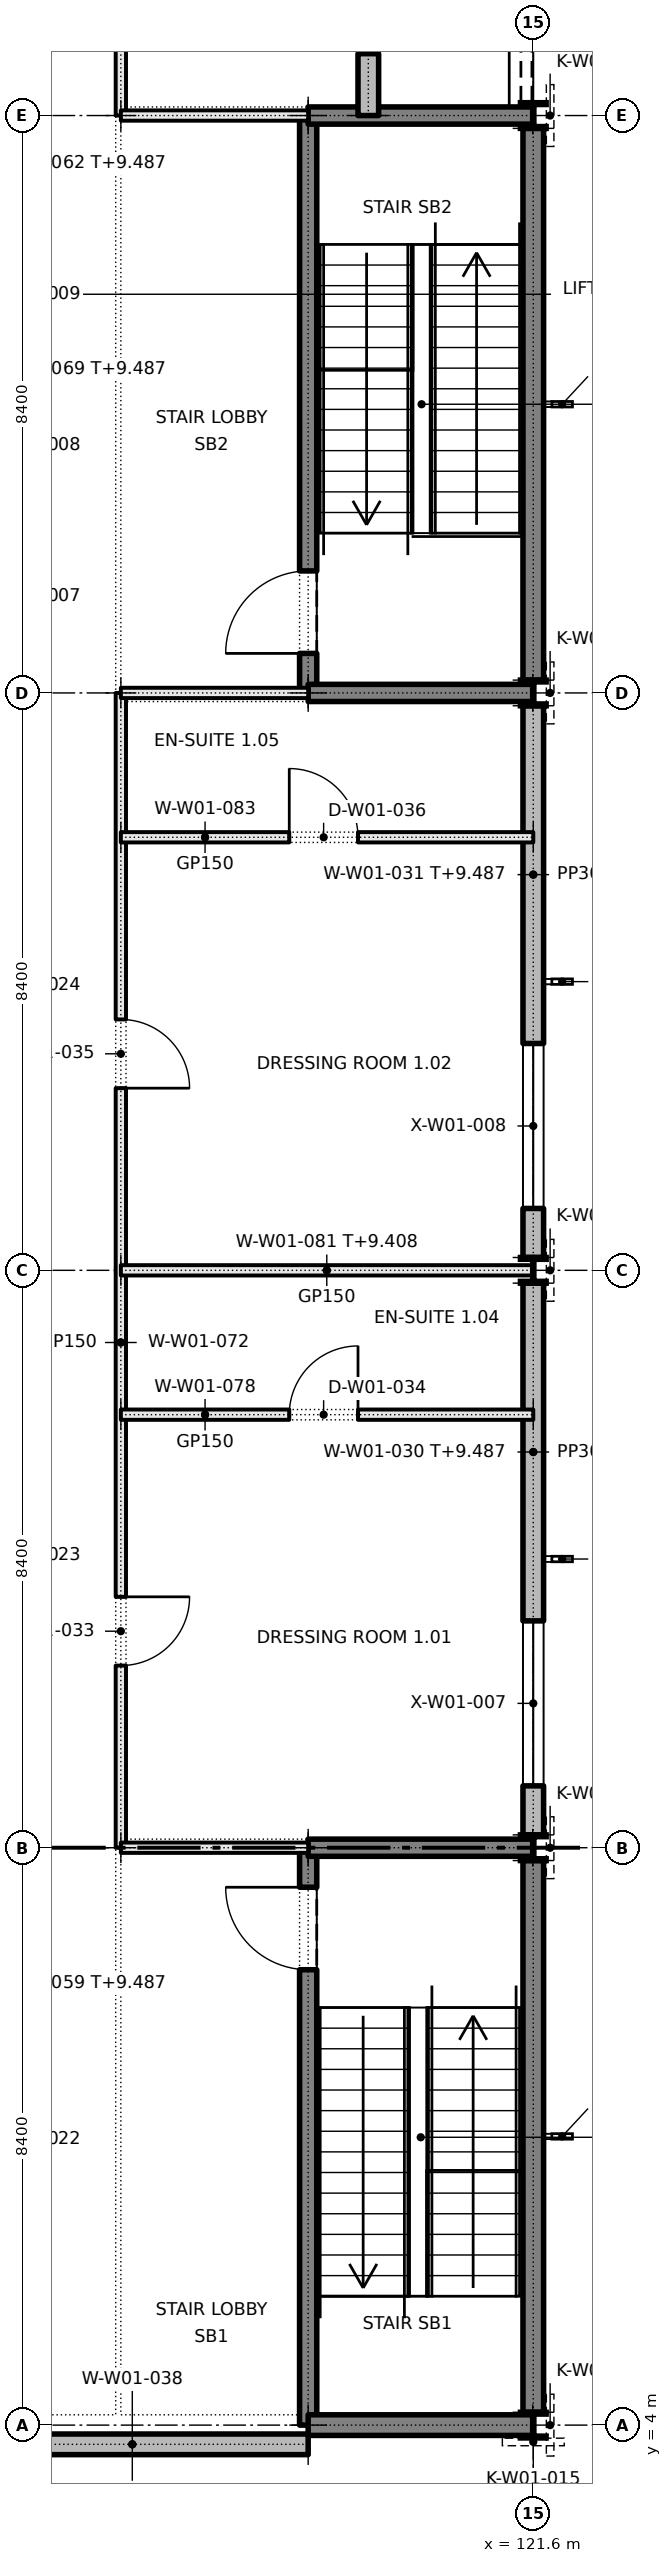
"""IFC4 building model, lengths in metres.
Left out: names, types, materials, properties, quantities, classifications, styles, units other than length and angle.
Written with IfcOpenShell. Run it as: python <this file> out.ifc"""

import sys

from ifc_helpers import new_model, si_unit, direction, frame, frame_2d, origin, origin_2d, place, context, subcontext, project, spatial, rectangle, i_section, extrude, element, fill, save


model = new_model("IFC4")
c1 = context("Model", 3, precision=1e-05, world=origin(), true_north=direction((0.0, 1.0)))
c2 = subcontext(c1, "Body", "Model", "MODEL_VIEW")
j1 = project(units=[si_unit("LENGTHUNIT", "METRE"), si_unit("PLANEANGLEUNIT", "RADIAN")], contexts=[c1])
p1 = place(None, origin())
s1 = spatial("IfcSite", under=j1, at=p1, CompositionType="ELEMENT")
p2 = place(p1, origin())
s2 = spatial("IfcBuilding", under=s1, at=p2, CompositionType="ELEMENT")
p3 = place(p2, frame((0.0, 0.0, 5.4)))
s3 = spatial("IfcBuildingStorey", under=s2, at=p3, CompositionType="ELEMENT", Elevation=5.4)
for number, where, z_axis, x_axis in (
    (1, (121.6, 4.0, 0.0), (0.0, 0.0, 1.0), (1.0, 0.0, 0.0)),
    (2, (121.6, 12.4, 0.0), (0.0, 0.0, 1.0), (1.0, 0.0, 0.0)),
    (3, (121.6, 20.8, 0.0), (0.0, 0.0, 1.0), (1.0, 0.0, 0.0)),
    (4, (121.6, 29.2, 0.0), (0.0, 0.0, 1.0), (1.0, 0.0, 0.0)),
    (5, (121.6, 37.6, 0.0), (0.0, 0.0, 1.0), (1.0, 0.0, 0.0)),
):
    element("IfcColumn", number, at=place(p3, frame(where, z_axis=z_axis, x_axis=x_axis)), inside=s3, PredefinedType="COLUMN", context=c2, shape_type="SweptSolid", body=[
        extrude(i_section(OverallWidth=0.373, OverallDepth=0.373, WebThickness=0.016, FlangeThickness=0.026, FilletRadius=0.015, at=origin_2d()), origin(), (0.0, 0.0, 1.0), 4.8),
    ])
p4 = place(p3, frame((118.325, 4.0, 0.0), z_axis=(0.0, 0.0, 1.0), x_axis=(0.0, 1.0, 0.0)))
e6 = element("IfcWall", 6, at=p4, inside=s3, PredefinedType="SHEAR", context=c2, shape_type="SweptSolid", body=[
    extrude(rectangle(XDim=8.4, YDim=0.25, at=frame_2d((4.2, 0.0))), origin(), (0.0, 0.0, 1.0), 4.8),
])
p5 = place(p4, frame((6.625, 0.0, 0.0)))
e7 = element("IfcOpeningElement", 7, at=p5, cuts=e6, PredefinedType="OPENING", context=c2, shape_type="SweptSolid", body=[
    extrude(rectangle(XDim=1.2, YDim=2.1, at=frame_2d((0.6, 1.05))), frame((0.0, 0.135, 0.0), z_axis=(0.0, -1.0, 0.0), x_axis=(1.0, 0.0, 0.0)), (0.0, 0.0, 1.0), 0.27),
])
p6 = place(p3, frame((118.325, 29.2, 0.0), z_axis=(0.0, 0.0, 1.0), x_axis=(0.0, 1.0, 0.0)))
e8 = element("IfcWall", 8, at=p6, inside=s3, PredefinedType="SHEAR", context=c2, shape_type="SweptSolid", body=[
    extrude(rectangle(XDim=8.4, YDim=0.25, at=frame_2d((4.2, 0.0))), origin(), (0.0, 0.0, 1.0), 4.8),
])
p7 = place(p6, frame((0.575, 0.0, 0.0)))
e9 = element("IfcOpeningElement", 9, at=p7, cuts=e8, PredefinedType="OPENING", context=c2, shape_type="SweptSolid", body=[
    extrude(rectangle(XDim=1.2, YDim=2.1, at=frame_2d((0.6, 1.05))), frame((0.0, 0.135, 0.0), z_axis=(0.0, -1.0, 0.0), x_axis=(1.0, 0.0, 0.0)), (0.0, 0.0, 1.0), 0.27),
])
for number, where, z_axis, x_axis in (
    (10, (121.6, 4.187, 0.0), (0.0, 0.0, 1.0), (0.0, 1.0, 0.0)),
    (11, (121.6, 29.387, 0.0), (0.0, 0.0, 1.0), (0.0, 1.0, 0.0)),
):
    element("IfcWall", number, at=place(p3, frame(where, z_axis=z_axis, x_axis=x_axis)), inside=s3, PredefinedType="SHEAR", context=c2, shape_type="SweptSolid", body=[
        extrude(rectangle(XDim=8.027, YDim=0.3, at=frame_2d((4.013, 0.0))), origin(), (0.0, 0.0, 1.0), 4.8),
    ])
p8 = place(p3, frame((118.325, 4.0, 0.0), z_axis=(0.0, 0.0, 1.0), x_axis=(1.0, 0.0, 0.0)))
e12 = element("IfcWall", 12, at=p8, inside=s3, PredefinedType="SHEAR", context=c2, shape_type="SweptSolid", body=[
    extrude(rectangle(XDim=3.267, YDim=0.3, at=frame_2d((1.633, 0.0))), origin(), (0.0, 0.0, 1.0), 4.8),
])
for number, where, z_axis, x_axis in (
    (13, (118.325, 12.4, 0.0), (0.0, 0.0, 1.0), (1.0, 0.0, 0.0)),
    (14, (118.325, 29.2, 0.0), (0.0, 0.0, 1.0), (1.0, 0.0, 0.0)),
    (15, (118.325, 37.6, 0.0), (0.0, 0.0, 1.0), (1.0, 0.0, 0.0)),
):
    element("IfcWall", number, at=place(p3, frame(where, z_axis=z_axis, x_axis=x_axis)), inside=s3, PredefinedType="SHEAR", context=c2, shape_type="SweptSolid", body=[
        extrude(rectangle(XDim=3.267, YDim=0.25, at=frame_2d((1.633, 0.0))), origin(), (0.0, 0.0, 1.0), 4.8),
    ])
p9 = place(p3, frame((121.6, 12.587, 0.0), z_axis=(0.0, 0.0, 1.0), x_axis=(0.0, 1.0, 0.0)))
e16 = element("IfcWall", 16, at=p9, inside=s3, PredefinedType="SOLIDWALL", context=c2, shape_type="SweptSolid", body=[
    extrude(rectangle(XDim=8.027, YDim=0.3, at=frame_2d((4.013, 0.0))), origin(), (0.0, 0.0, 1.0), 4.087),
])
p10 = place(p9, frame((0.713, 0.0, 0.95)))
e17 = element("IfcOpeningElement", 17, at=p10, cuts=e16, PredefinedType="OPENING", context=c2, shape_type="SweptSolid", body=[
    extrude(rectangle(XDim=2.4, YDim=1.8, at=frame_2d((1.2, 0.9))), frame((0.0, 0.16, 0.0), z_axis=(0.0, -1.0, 0.0), x_axis=(1.0, 0.0, 0.0)), (0.0, 0.0, 1.0), 0.32),
])
p11 = place(p3, frame((121.6, 20.987, 0.0), z_axis=(0.0, 0.0, 1.0), x_axis=(0.0, 1.0, 0.0)))
e18 = element("IfcWall", 18, at=p11, inside=s3, PredefinedType="SOLIDWALL", context=c2, shape_type="SweptSolid", body=[
    extrude(rectangle(XDim=8.027, YDim=0.3, at=frame_2d((4.013, 0.0))), origin(), (0.0, 0.0, 1.0), 4.087),
])
p12 = place(p11, frame((0.713, 0.0, 0.95)))
e19 = element("IfcOpeningElement", 19, at=p12, cuts=e18, PredefinedType="OPENING", context=c2, shape_type="SweptSolid", body=[
    extrude(rectangle(XDim=2.4, YDim=1.8, at=frame_2d((1.2, 0.9))), frame((0.0, 0.16, 0.0), z_axis=(0.0, -1.0, 0.0), x_axis=(1.0, 0.0, 0.0)), (0.0, 0.0, 1.0), 0.32),
])
p13 = place(p3, frame((113.208, 3.72, 0.0), z_axis=(0.0, 0.0, 1.0), x_axis=(1.0, 0.0, 0.0)))
e20 = element("IfcWall", 20, at=p13, inside=s3, PredefinedType="SOLIDWALL", context=c2, shape_type="SweptSolid", body=[
    extrude(rectangle(XDim=5.117, YDim=0.3, at=frame_2d((2.558, 0.0))), origin(), (0.0, 0.0, 1.0), 4.8),
])
p14 = place(p3, frame((115.6, 12.4, 0.0), z_axis=(0.0, 0.0, 1.0), x_axis=(0.0, 1.0, 0.0)))
e21 = element("IfcWall", 21, at=p14, inside=s3, PredefinedType="PARTITIONING", context=c2, shape_type="SweptSolid", body=[
    extrude(rectangle(XDim=16.8, YDim=0.15, at=frame_2d((8.4, 0.0))), origin(), (0.0, 0.0, 1.0), 4.8),
])
p15 = place(p14, frame((2.65, 0.0, 0.0)))
e22 = element("IfcOpeningElement", 22, at=p15, cuts=e21, PredefinedType="OPENING", context=c2, shape_type="SweptSolid", body=[
    extrude(rectangle(XDim=1.0, YDim=2.1, at=frame_2d((0.5, 1.05))), frame((0.0, 0.085, 0.0), z_axis=(0.0, -1.0, 0.0), x_axis=(1.0, 0.0, 0.0)), (0.0, 0.0, 1.0), 0.17),
])
p16 = place(p14, frame((11.05, 0.0, 0.0)))
e23 = element("IfcOpeningElement", 23, at=p16, cuts=e21, PredefinedType="OPENING", context=c2, shape_type="SweptSolid", body=[
    extrude(rectangle(XDim=1.0, YDim=2.1, at=frame_2d((0.5, 1.05))), frame((0.0, 0.085, 0.0), z_axis=(0.0, -1.0, 0.0), x_axis=(1.0, 0.0, 0.0)), (0.0, 0.0, 1.0), 0.17),
])
p17 = place(p3, frame((115.6, 37.6, 0.0), z_axis=(0.0, 0.0, 1.0), x_axis=(0.0, 1.0, 0.0)))
e24 = element("IfcWall", 24, at=p17, inside=s3, PredefinedType="PARTITIONING", context=c2, shape_type="SweptSolid", body=[
    extrude(rectangle(XDim=21.0, YDim=0.15, at=frame_2d((10.5, 0.0))), origin(), (0.0, 0.0, 1.0), 4.8),
])
p18 = place(p17, frame((7.85, 0.0, 0.0)))
e25 = element("IfcOpeningElement", 25, at=p18, cuts=e24, PredefinedType="OPENING", context=c2, shape_type="SweptSolid", body=[
    extrude(rectangle(XDim=1.0, YDim=2.1, at=frame_2d((0.5, 1.05))), frame((0.0, 0.085, 0.0), z_axis=(0.0, -1.0, 0.0), x_axis=(1.0, 0.0, 0.0)), (0.0, 0.0, 1.0), 0.17),
])
p19 = place(p17, frame((18.35, 0.0, 0.0)))
e26 = element("IfcOpeningElement", 26, at=p19, cuts=e24, PredefinedType="OPENING", context=c2, shape_type="SweptSolid", body=[
    extrude(rectangle(XDim=1.0, YDim=2.1, at=frame_2d((0.5, 1.05))), frame((0.0, 0.085, 0.0), z_axis=(0.0, -1.0, 0.0), x_axis=(1.0, 0.0, 0.0)), (0.0, 0.0, 1.0), 0.17),
])
p20 = place(p3, frame((119.2, 37.6, 0.0), z_axis=(0.0, 0.0, 1.0), x_axis=(0.0, 1.0, 0.0)))
e27 = element("IfcWall", 27, at=p20, inside=s3, PredefinedType="SOLIDWALL", context=c2, shape_type="SweptSolid", body=[
    extrude(rectangle(XDim=16.8, YDim=0.3, at=frame_2d((8.4, 0.0))), origin(), (0.0, 0.0, 1.0), 4.8),
])
p21 = place(p20, frame((7.45, 0.0, 0.0)))
e28 = element("IfcOpeningElement", 28, at=p21, cuts=e27, PredefinedType="OPENING", context=c2, shape_type="SweptSolid", body=[
    extrude(rectangle(XDim=1.8, YDim=2.1, at=frame_2d((0.9, 1.05))), frame((0.0, 0.16, 0.0), z_axis=(0.0, -1.0, 0.0), x_axis=(1.0, 0.0, 0.0)), (0.0, 0.0, 1.0), 0.32),
])
p22 = place(p20, frame((0.9, 0.0, 0.95)))
e29 = element("IfcOpeningElement", 29, at=p22, cuts=e27, PredefinedType="OPENING", context=c2, shape_type="SweptSolid", body=[
    extrude(rectangle(XDim=2.4, YDim=1.8, at=frame_2d((1.2, 0.9))), frame((0.0, 0.16, 0.0), z_axis=(0.0, -1.0, 0.0), x_axis=(1.0, 0.0, 0.0)), (0.0, 0.0, 1.0), 0.32),
])
p23 = place(p20, frame((13.5, 0.0, 0.95)))
e30 = element("IfcOpeningElement", 30, at=p23, cuts=e27, PredefinedType="OPENING", context=c2, shape_type="SweptSolid", body=[
    extrude(rectangle(XDim=2.4, YDim=1.8, at=frame_2d((1.2, 0.9))), frame((0.0, 0.16, 0.0), z_axis=(0.0, -1.0, 0.0), x_axis=(1.0, 0.0, 0.0)), (0.0, 0.0, 1.0), 0.32),
])
p24 = place(p3, frame((115.6, 12.4, 0.0), z_axis=(0.0, 0.0, 1.0), x_axis=(1.0, 0.0, 0.0)))
e31 = element("IfcWall", 31, at=p24, inside=s3, PredefinedType="PARTITIONING", context=c2, shape_type="SweptSolid", body=[
    extrude(rectangle(XDim=2.725, YDim=0.15, at=frame_2d((1.362, 0.0))), origin(), (0.0, 0.0, 1.0), 4.008),
])
p25 = place(p3, frame((115.6, 18.7, 0.0), z_axis=(0.0, 0.0, 1.0), x_axis=(1.0, 0.0, 0.0)))
e32 = element("IfcWall", 32, at=p25, inside=s3, PredefinedType="PARTITIONING", context=c2, shape_type="SweptSolid", body=[
    extrude(rectangle(XDim=6.0, YDim=0.15, at=frame_2d((3.0, 0.0))), origin(), (0.0, 0.0, 1.0), 4.8),
])
p26 = place(p25, frame((2.45, 0.0, 0.0)))
e33 = element("IfcOpeningElement", 33, at=p26, cuts=e32, PredefinedType="OPENING", context=c2, shape_type="SweptSolid", body=[
    extrude(rectangle(XDim=1.0, YDim=2.1, at=frame_2d((0.5, 1.05))), frame((0.0, 0.085, 0.0), z_axis=(0.0, -1.0, 0.0), x_axis=(1.0, 0.0, 0.0)), (0.0, 0.0, 1.0), 0.17),
])
p27 = place(p3, frame((115.6, 20.8, 0.0), z_axis=(0.0, 0.0, 1.0), x_axis=(1.0, 0.0, 0.0)))
e34 = element("IfcWall", 34, at=p27, inside=s3, PredefinedType="PARTITIONING", context=c2, shape_type="SweptSolid", body=[
    extrude(rectangle(XDim=5.992, YDim=0.15, at=frame_2d((2.996, 0.0))), origin(), (0.0, 0.0, 1.0), 4.008),
])
p28 = place(p3, frame((115.6, 27.1, 0.0), z_axis=(0.0, 0.0, 1.0), x_axis=(1.0, 0.0, 0.0)))
e35 = element("IfcWall", 35, at=p28, inside=s3, PredefinedType="PARTITIONING", context=c2, shape_type="SweptSolid", body=[
    extrude(rectangle(XDim=6.0, YDim=0.15, at=frame_2d((3.0, 0.0))), origin(), (0.0, 0.0, 1.0), 4.8),
])
p29 = place(p28, frame((2.45, 0.0, 0.0)))
e36 = element("IfcOpeningElement", 36, at=p29, cuts=e35, PredefinedType="OPENING", context=c2, shape_type="SweptSolid", body=[
    extrude(rectangle(XDim=1.0, YDim=2.1, at=frame_2d((0.5, 1.05))), frame((0.0, 0.085, 0.0), z_axis=(0.0, -1.0, 0.0), x_axis=(1.0, 0.0, 0.0)), (0.0, 0.0, 1.0), 0.17),
])
for number, where, z_axis, x_axis in (
    (37, (115.6, 29.2, 0.0), (0.0, 0.0, 1.0), (1.0, 0.0, 0.0)),
    (38, (115.6, 37.6, 0.0), (0.0, 0.0, 1.0), (1.0, 0.0, 0.0)),
):
    element("IfcWall", number, at=place(p3, frame(where, z_axis=z_axis, x_axis=x_axis)), inside=s3, PredefinedType="PARTITIONING", context=c2, shape_type="SweptSolid", body=[
        extrude(rectangle(XDim=2.725, YDim=0.15, at=frame_2d((1.362, 0.0))), origin(), (0.0, 0.0, 1.0), 4.008),
    ])
p30 = place(p10, origin())
e39 = element("IfcWindow", 39, at=p30, inside=s3, PartitioningType="DOUBLE_PANEL_VERTICAL", PredefinedType="WINDOW", context=c2, shape_type="SweptSolid", body=[
    extrude(rectangle(XDim=2.4, YDim=1.8, at=frame_2d((1.2, 0.9))), frame((0.0, 0.03, 0.0), z_axis=(0.0, -1.0, 0.0), x_axis=(1.0, 0.0, 0.0)), (0.0, 0.0, 1.0), 0.06),
])
fill(e17, e39)
p31 = place(p12, origin())
e40 = element("IfcWindow", 40, at=p31, inside=s3, PartitioningType="DOUBLE_PANEL_VERTICAL", PredefinedType="WINDOW", context=c2, shape_type="SweptSolid", body=[
    extrude(rectangle(XDim=2.4, YDim=1.8, at=frame_2d((1.2, 0.9))), frame((0.0, 0.03, 0.0), z_axis=(0.0, -1.0, 0.0), x_axis=(1.0, 0.0, 0.0)), (0.0, 0.0, 1.0), 0.06),
])
fill(e19, e40)
p32 = place(p5, origin())
e41 = element("IfcDoor", 41, at=p32, inside=s3, OperationType="SINGLE_SWING_RIGHT", PredefinedType="DOOR", context=c2, shape_type="SweptSolid", body=[
    extrude(rectangle(XDim=1.2, YDim=2.1, at=frame_2d((0.6, 1.05))), frame((0.0, 0.025, 0.0), z_axis=(0.0, -1.0, 0.0), x_axis=(1.0, 0.0, 0.0)), (0.0, 0.0, 1.0), 0.05),
])
fill(e7, e41)
p33 = place(p7, origin())
e42 = element("IfcDoor", 42, at=p33, inside=s3, OperationType="SINGLE_SWING_LEFT", PredefinedType="DOOR", context=c2, shape_type="SweptSolid", body=[
    extrude(rectangle(XDim=1.2, YDim=2.1, at=frame_2d((0.6, 1.05))), frame((0.0, 0.025, 0.0), z_axis=(0.0, -1.0, 0.0), x_axis=(1.0, 0.0, 0.0)), (0.0, 0.0, 1.0), 0.05),
])
fill(e9, e42)
p34 = place(p15, frame((1.0, 0.0, 0.0), z_axis=(0.0, 0.0, 1.0), x_axis=(-1.0, 0.0, 0.0)))
e43 = element("IfcDoor", 43, at=p34, inside=s3, OperationType="SINGLE_SWING_LEFT", PredefinedType="DOOR", context=c2, shape_type="SweptSolid", body=[
    extrude(rectangle(XDim=1.0, YDim=2.1, at=frame_2d((0.5, 1.05))), frame((0.0, 0.025, 0.0), z_axis=(0.0, -1.0, 0.0), x_axis=(1.0, 0.0, 0.0)), (0.0, 0.0, 1.0), 0.05),
])
fill(e22, e43)
p35 = place(p26, origin())
e44 = element("IfcDoor", 44, at=p35, inside=s3, OperationType="SINGLE_SWING_RIGHT", PredefinedType="DOOR", context=c2, shape_type="SweptSolid", body=[
    extrude(rectangle(XDim=1.0, YDim=2.1, at=frame_2d((0.5, 1.05))), frame((0.0, 0.025, 0.0), z_axis=(0.0, -1.0, 0.0), x_axis=(1.0, 0.0, 0.0)), (0.0, 0.0, 1.0), 0.05),
])
fill(e33, e44)
p36 = place(p16, frame((1.0, 0.0, 0.0), z_axis=(0.0, 0.0, 1.0), x_axis=(-1.0, 0.0, 0.0)))
e45 = element("IfcDoor", 45, at=p36, inside=s3, OperationType="SINGLE_SWING_RIGHT", PredefinedType="DOOR", context=c2, shape_type="SweptSolid", body=[
    extrude(rectangle(XDim=1.0, YDim=2.1, at=frame_2d((0.5, 1.05))), frame((0.0, 0.025, 0.0), z_axis=(0.0, -1.0, 0.0), x_axis=(1.0, 0.0, 0.0)), (0.0, 0.0, 1.0), 0.05),
])
fill(e23, e45)
p37 = place(p29, origin())
e46 = element("IfcDoor", 46, at=p37, inside=s3, OperationType="SINGLE_SWING_LEFT", PredefinedType="DOOR", context=c2, shape_type="SweptSolid", body=[
    extrude(rectangle(XDim=1.0, YDim=2.1, at=frame_2d((0.5, 1.05))), frame((0.0, 0.025, 0.0), z_axis=(0.0, -1.0, 0.0), x_axis=(1.0, 0.0, 0.0)), (0.0, 0.0, 1.0), 0.05),
])
fill(e36, e46)
p38 = place(p22, origin())
e47 = element("IfcWindow", 47, at=p38, inside=s3, PartitioningType="DOUBLE_PANEL_VERTICAL", PredefinedType="WINDOW", context=c2, shape_type="SweptSolid", body=[
    extrude(rectangle(XDim=2.4, YDim=1.8, at=frame_2d((1.2, 0.9))), frame((0.0, 0.03, 0.0), z_axis=(0.0, -1.0, 0.0), x_axis=(1.0, 0.0, 0.0)), (0.0, 0.0, 1.0), 0.06),
])
fill(e29, e47)
save(model, sys.argv[1])
